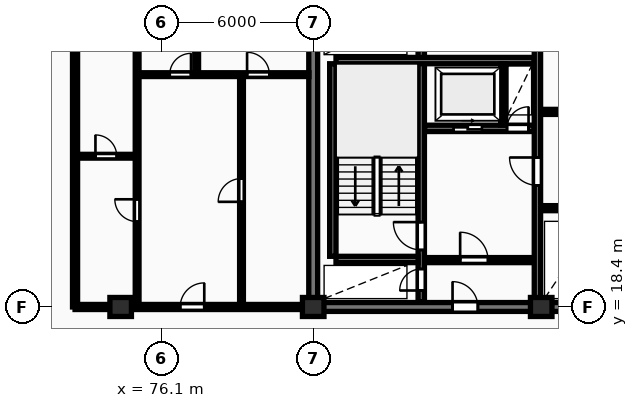
"""IFC4 building model, lengths in metres.
Left out: names, types, materials, properties, quantities, classifications, styles, units other than length and angle.
Written with IfcOpenShell. Run it as: python <this file> out.ifc"""

import sys

from ifc_helpers import new_model, si_unit, direction, frame, frame_2d, origin, origin_2d, place, context, subcontext, project, spatial, rectangle, extrude, element, fill, save


model = new_model("IFC4")
c1 = context("Model", 3, precision=1e-05, world=origin(), true_north=direction((0.0, 1.0)))
c2 = subcontext(c1, "Body", "Model", "MODEL_VIEW")
j1 = project(units=[si_unit("LENGTHUNIT", "METRE"), si_unit("PLANEANGLEUNIT", "RADIAN")], contexts=[c1])
p1 = place(None, origin())
s1 = spatial("IfcSite", under=j1, at=p1, CompositionType="ELEMENT")
p2 = place(p1, origin())
s2 = spatial("IfcBuilding", under=s1, at=p2, CompositionType="ELEMENT")
p3 = place(p2, frame((0.0, 0.0, 106.8)))
s3 = spatial("IfcBuildingStorey", under=s2, at=p3, CompositionType="ELEMENT", Elevation=106.8)
for number, where, z_axis, x_axis in (
    (1, (74.5, 18.4, 0.0), (0.0, 0.0, 1.0), (1.0, 0.0, 0.0)),
    (2, (82.1, 18.4, 0.0), (0.0, 0.0, 1.0), (1.0, 0.0, 0.0)),
    (3, (91.1, 18.4, 0.0), (0.0, 0.0, 1.0), (1.0, 0.0, 0.0)),
):
    element("IfcColumn", number, at=place(p3, frame(where, z_axis=z_axis, x_axis=x_axis)), inside=s3, PredefinedType="COLUMN", context=c2, shape_type="SweptSolid", body=[
        extrude(rectangle(XDim=0.85, YDim=0.75, at=origin_2d()), origin(), (0.0, 0.0, 1.0), 3.25),
    ])
p4 = place(p3, frame((82.1, 18.575, 0.0), z_axis=(0.0, 0.0, 1.0), x_axis=(0.0, 1.0, 0.0)))
e4 = element("IfcWall", 4, at=p4, inside=s3, PredefinedType="SHEAR", context=c2, shape_type="SweptSolid", body=[
    extrude(rectangle(XDim=11.65, YDim=0.35, at=frame_2d((5.825, 0.0))), origin(), (0.0, 0.0, 1.0), 3.25),
])
p5 = place(p3, frame((81.925, 18.4, 0.0), z_axis=(0.0, 0.0, 1.0), x_axis=(1.0, 0.0, 0.0)))
e5 = element("IfcWall", 5, at=p5, inside=s3, PredefinedType="SHEAR", context=c2, shape_type="SweptSolid", body=[
    extrude(rectangle(XDim=36.265, YDim=0.35, at=frame_2d((18.132, 0.0))), origin(), (0.0, 0.0, 1.0), 3.25),
])
p6 = place(p5, frame((5.675, 0.0, 0.0)))
e6 = element("IfcOpeningElement", 6, at=p6, cuts=e5, PredefinedType="OPENING", context=c2, shape_type="SweptSolid", body=[
    extrude(rectangle(XDim=1.0, YDim=2.15, at=frame_2d((0.5, 1.075))), frame((0.0, 0.185, 0.0), z_axis=(0.0, -1.0, 0.0), x_axis=(1.0, 0.0, 0.0)), (0.0, 0.0, 1.0), 0.37),
])
p7 = place(p5, frame((21.925, 0.0, 0.0)))
e7 = element("IfcOpeningElement", 7, at=p7, cuts=e5, PredefinedType="OPENING", context=c2, shape_type="SweptSolid", body=[
    extrude(rectangle(XDim=1.5, YDim=2.2, at=frame_2d((0.75, 1.1))), frame((0.0, 0.185, 0.0), z_axis=(0.0, -1.0, 0.0), x_axis=(1.0, 0.0, 0.0)), (0.0, 0.0, 1.0), 0.37),
])
p8 = place(p5, frame((29.875, 0.0, 0.0)))
e8 = element("IfcOpeningElement", 8, at=p8, cuts=e5, PredefinedType="OPENING", context=c2, shape_type="SweptSolid", body=[
    extrude(rectangle(XDim=1.0, YDim=2.15, at=frame_2d((0.5, 1.075))), frame((0.0, 0.185, 0.0), z_axis=(0.0, -1.0, 0.0), x_axis=(1.0, 0.0, 0.0)), (0.0, 0.0, 1.0), 0.37),
])
p9 = place(p3, frame((82.875, 20.4, 0.0), z_axis=(0.0, 0.0, 1.0), x_axis=(0.0, 1.0, 0.0)))
e9 = element("IfcWall", 9, at=p9, inside=s3, PredefinedType="SHEAR", context=c2, shape_type="SweptSolid", body=[
    extrude(rectangle(XDim=7.6, YDim=0.25, at=frame_2d((3.8, 0.0))), origin(), (0.0, 0.0, 1.0), 3.25),
])
p10 = place(p3, frame((86.365, 18.6, 0.0), z_axis=(0.0, 0.0, 1.0), x_axis=(0.0, 1.0, 0.0)))
e10 = element("IfcWall", 10, at=p10, inside=s3, PredefinedType="SHEAR", context=c2, shape_type="SweptSolid", body=[
    extrude(rectangle(XDim=11.6, YDim=0.25, at=frame_2d((5.8, 0.0))), origin(), (0.0, 0.0, 1.0), 3.25),
])
p11 = place(p10, frame((0.45, 0.0, 0.0)))
e11 = element("IfcOpeningElement", 11, at=p11, cuts=e10, PredefinedType="OPENING", context=c2, shape_type="SweptSolid", body=[
    extrude(rectangle(XDim=0.85, YDim=2.05, at=frame_2d((0.425, 1.025))), frame((0.0, 0.135, 0.0), z_axis=(0.0, -1.0, 0.0), x_axis=(1.0, 0.0, 0.0)), (0.0, 0.0, 1.0), 0.27),
])
p12 = place(p10, frame((2.05, 0.0, 0.0)))
e12 = element("IfcOpeningElement", 12, at=p12, cuts=e10, PredefinedType="OPENING", context=c2, shape_type="SweptSolid", body=[
    extrude(rectangle(XDim=1.1, YDim=2.1, at=frame_2d((0.55, 1.05))), frame((0.0, 0.135, 0.0), z_axis=(0.0, -1.0, 0.0), x_axis=(1.0, 0.0, 0.0)), (0.0, 0.0, 1.0), 0.27),
])
p13 = place(p10, frame((9.95, 0.0, 0.0)))
e13 = element("IfcOpeningElement", 13, at=p13, cuts=e10, PredefinedType="OPENING", context=c2, shape_type="SweptSolid", body=[
    extrude(rectangle(XDim=0.85, YDim=2.05, at=frame_2d((0.425, 1.025))), frame((0.0, 0.135, 0.0), z_axis=(0.0, -1.0, 0.0), x_axis=(1.0, 0.0, 0.0)), (0.0, 0.0, 1.0), 0.27),
])
p14 = place(p3, frame((83.0, 20.275, 0.0), z_axis=(0.0, 0.0, 1.0), x_axis=(1.0, 0.0, 0.0)))
e14 = element("IfcWall", 14, at=p14, inside=s3, PredefinedType="SHEAR", context=c2, shape_type="SweptSolid", body=[
    extrude(rectangle(XDim=3.24, YDim=0.25, at=frame_2d((1.62, 0.0))), origin(), (0.0, 0.0, 1.0), 3.25),
])
p15 = place(p3, frame((83.0, 28.125, 0.0), z_axis=(0.0, 0.0, 1.0), x_axis=(1.0, 0.0, 0.0)))
e15 = element("IfcWall", 15, at=p15, inside=s3, PredefinedType="SHEAR", context=c2, shape_type="SweptSolid", body=[
    extrude(rectangle(XDim=7.82, YDim=0.25, at=frame_2d((3.91, 0.0))), origin(), (0.0, 0.0, 1.0), 3.25),
])
p16 = place(p3, frame((86.5, 25.45, 0.0), z_axis=(0.0, 0.0, 1.0), x_axis=(1.0, 0.0, 0.0)))
e16 = element("IfcWall", 16, at=p16, inside=s3, PredefinedType="SHEAR", context=c2, shape_type="SweptSolid", body=[
    extrude(rectangle(XDim=4.32, YDim=0.25, at=frame_2d((2.16, 0.0))), origin(), (0.0, 0.0, 1.0), 3.25),
])
p17 = place(p16, frame((1.14, 0.0, 0.0)))
e17 = element("IfcOpeningElement", 17, at=p17, cuts=e16, PredefinedType="OPENING", context=c2, shape_type="SweptSolid", body=[
    extrude(rectangle(XDim=1.12, YDim=2.12, at=frame_2d((0.56, 1.06))), frame((0.0, 0.135, 0.0), z_axis=(0.0, -1.0, 0.0), x_axis=(1.0, 0.0, 0.0)), (0.0, 0.0, 1.0), 0.27),
])
p18 = place(p16, frame((3.25, 0.0, 0.0)))
e18 = element("IfcOpeningElement", 18, at=p18, cuts=e16, PredefinedType="OPENING", context=c2, shape_type="SweptSolid", body=[
    extrude(rectangle(XDim=0.85, YDim=2.05, at=frame_2d((0.425, 1.025))), frame((0.0, 0.135, 0.0), z_axis=(0.0, -1.0, 0.0), x_axis=(1.0, 0.0, 0.0)), (0.0, 0.0, 1.0), 0.27),
])
p19 = place(p3, frame((89.6, 25.58, 0.0), z_axis=(0.0, 0.0, 1.0), x_axis=(0.0, 1.0, 0.0)))
e19 = element("IfcWall", 19, at=p19, inside=s3, PredefinedType="PARTITIONING", context=c2, shape_type="SweptSolid", body=[
    extrude(rectangle(XDim=2.42, YDim=0.2, at=frame_2d((1.21, 0.0))), origin(), (0.0, 0.0, 1.0), 2.97),
])
p20 = place(p3, frame((86.5, 20.25, 0.0), z_axis=(0.0, 0.0, 1.0), x_axis=(1.0, 0.0, 0.0)))
e20 = element("IfcWall", 20, at=p20, inside=s3, PredefinedType="PARTITIONING", context=c2, shape_type="SweptSolid", body=[
    extrude(rectangle(XDim=4.32, YDim=0.2, at=frame_2d((2.16, 0.0))), origin(), (0.0, 0.0, 1.0), 2.97),
])
p21 = place(p20, frame((1.4, 0.0, 0.0)))
e21 = element("IfcOpeningElement", 21, at=p21, cuts=e20, PredefinedType="OPENING", context=c2, shape_type="SweptSolid", body=[
    extrude(rectangle(XDim=1.1, YDim=2.1, at=frame_2d((0.55, 1.05))), frame((0.0, 0.11, 0.0), z_axis=(0.0, -1.0, 0.0), x_axis=(1.0, 0.0, 0.0)), (0.0, 0.0, 1.0), 0.22),
])
p22 = place(p3, frame((90.95, 18.6, 0.0), z_axis=(0.0, 0.0, 1.0), x_axis=(0.0, 1.0, 0.0)))
e22 = element("IfcWall", 22, at=p22, inside=s3, PredefinedType="SHEAR", context=c2, shape_type="SweptSolid", body=[
    extrude(rectangle(XDim=11.6, YDim=0.25, at=frame_2d((5.8, 0.0))), origin(), (0.0, 0.0, 1.0), 3.25),
])
p23 = place(p22, frame((4.6, 0.0, 0.0)))
e23 = element("IfcOpeningElement", 23, at=p23, cuts=e22, PredefinedType="OPENING", context=c2, shape_type="SweptSolid", body=[
    extrude(rectangle(XDim=1.1, YDim=2.1, at=frame_2d((0.55, 1.05))), frame((0.0, 0.135, 0.0), z_axis=(0.0, -1.0, 0.0), x_axis=(1.0, 0.0, 0.0)), (0.0, 0.0, 1.0), 0.27),
])
p24 = place(p3, frame((91.08, 26.1, 0.0), z_axis=(0.0, 0.0, 1.0), x_axis=(1.0, 0.0, 0.0)))
e24 = element("IfcWall", 24, at=p24, inside=s3, PredefinedType="PARTITIONING", context=c2, shape_type="SweptSolid", body=[
    extrude(rectangle(XDim=8.34, YDim=0.2, at=frame_2d((4.17, 0.0))), origin(), (0.0, 0.0, 1.0), 2.97),
])
p25 = place(p24, frame((3.4, 0.0, 0.0)))
e25 = element("IfcOpeningElement", 25, at=p25, cuts=e24, PredefinedType="OPENING", context=c2, shape_type="SweptSolid", body=[
    extrude(rectangle(XDim=0.92, YDim=2.08, at=frame_2d((0.46, 1.04))), frame((0.0, 0.11, 0.0), z_axis=(0.0, -1.0, 0.0), x_axis=(1.0, 0.0, 0.0)), (0.0, 0.0, 1.0), 0.22),
])
p26 = place(p3, frame((91.08, 22.3, 0.0), z_axis=(0.0, 0.0, 1.0), x_axis=(1.0, 0.0, 0.0)))
e26 = element("IfcWall", 26, at=p26, inside=s3, PredefinedType="PARTITIONING", context=c2, shape_type="SweptSolid", body=[
    extrude(rectangle(XDim=19.14, YDim=0.2, at=frame_2d((9.57, 0.0))), origin(), (0.0, 0.0, 1.0), 2.97),
])
p27 = place(p26, frame((1.15, 0.0, 0.0)))
e27 = element("IfcOpeningElement", 27, at=p27, cuts=e26, PredefinedType="OPENING", context=c2, shape_type="SweptSolid", body=[
    extrude(rectangle(XDim=0.85, YDim=2.05, at=frame_2d((0.425, 1.025))), frame((0.0, 0.11, 0.0), z_axis=(0.0, -1.0, 0.0), x_axis=(1.0, 0.0, 0.0)), (0.0, 0.0, 1.0), 0.22),
])
p28 = place(p26, frame((3.2, 0.0, 0.0)))
e28 = element("IfcOpeningElement", 28, at=p28, cuts=e26, PredefinedType="OPENING", context=c2, shape_type="SweptSolid", body=[
    extrude(rectangle(XDim=0.85, YDim=2.05, at=frame_2d((0.425, 1.025))), frame((0.0, 0.11, 0.0), z_axis=(0.0, -1.0, 0.0), x_axis=(1.0, 0.0, 0.0)), (0.0, 0.0, 1.0), 0.22),
])
p29 = place(p26, frame((12.72, 0.0, 0.0)))
e29 = element("IfcOpeningElement", 29, at=p29, cuts=e26, PredefinedType="OPENING", context=c2, shape_type="SweptSolid", body=[
    extrude(rectangle(XDim=1.5, YDim=2.2, at=frame_2d((0.75, 1.1))), frame((0.0, 0.11, 0.0), z_axis=(0.0, -1.0, 0.0), x_axis=(1.0, 0.0, 0.0)), (0.0, 0.0, 1.0), 0.22),
])
p30 = place(p26, frame((5.52, 0.0, 0.0)))
e30 = element("IfcOpeningElement", 30, at=p30, cuts=e26, PredefinedType="OPENING", context=c2, shape_type="SweptSolid", body=[
    extrude(rectangle(XDim=0.88, YDim=2.06, at=frame_2d((0.44, 1.03))), frame((0.0, 0.11, 0.0), z_axis=(0.0, -1.0, 0.0), x_axis=(1.0, 0.0, 0.0)), (0.0, 0.0, 1.0), 0.22),
])
p31 = place(p26, frame((7.67, 0.0, 0.0)))
e31 = element("IfcOpeningElement", 31, at=p31, cuts=e26, PredefinedType="OPENING", context=c2, shape_type="SweptSolid", body=[
    extrude(rectangle(XDim=0.88, YDim=2.06, at=frame_2d((0.44, 1.03))), frame((0.0, 0.11, 0.0), z_axis=(0.0, -1.0, 0.0), x_axis=(1.0, 0.0, 0.0)), (0.0, 0.0, 1.0), 0.22),
])
p32 = place(p26, frame((10.27, 0.0, 0.0)))
e32 = element("IfcOpeningElement", 32, at=p32, cuts=e26, PredefinedType="OPENING", context=c2, shape_type="SweptSolid", body=[
    extrude(rectangle(XDim=0.85, YDim=2.05, at=frame_2d((0.425, 1.025))), frame((0.0, 0.11, 0.0), z_axis=(0.0, -1.0, 0.0), x_axis=(1.0, 0.0, 0.0)), (0.0, 0.0, 1.0), 0.22),
])
p33 = place(p26, frame((15.92, 0.0, 0.0)))
e33 = element("IfcOpeningElement", 33, at=p33, cuts=e26, PredefinedType="OPENING", context=c2, shape_type="SweptSolid", body=[
    extrude(rectangle(XDim=0.96, YDim=2.1, at=frame_2d((0.48, 1.05))), frame((0.0, 0.11, 0.0), z_axis=(0.0, -1.0, 0.0), x_axis=(1.0, 0.0, 0.0)), (0.0, 0.0, 1.0), 0.22),
])
p34 = place(p3, frame((72.7, 18.4, 0.0), z_axis=(0.0, 0.0, 1.0), x_axis=(0.0, 1.0, 0.0)))
e34 = element("IfcWall", 34, at=p34, inside=s3, PredefinedType="PARTITIONING", context=c2, shape_type="SweptSolid", body=[
    extrude(rectangle(XDim=14.1, YDim=0.2, at=frame_2d((7.05, 0.0))), origin(), (0.0, 0.0, 1.0), 2.97),
])
p35 = place(p3, frame((72.7, 24.35, 0.0), z_axis=(0.0, 0.0, 1.0), x_axis=(1.0, 0.0, 0.0)))
e35 = element("IfcWall", 35, at=p35, inside=s3, PredefinedType="PARTITIONING", context=c2, shape_type="SweptSolid", body=[
    extrude(rectangle(XDim=2.45, YDim=0.15, at=frame_2d((1.225, 0.0))), origin(), (0.0, 0.0, 1.0), 2.97),
])
p36 = place(p35, frame((0.805, 0.0, 0.0)))
e36 = element("IfcOpeningElement", 36, at=p36, cuts=e35, PredefinedType="OPENING", context=c2, shape_type="SweptSolid", body=[
    extrude(rectangle(XDim=0.84, YDim=2.04, at=frame_2d((0.42, 1.02))), frame((0.0, 0.085, 0.0), z_axis=(0.0, -1.0, 0.0), x_axis=(1.0, 0.0, 0.0)), (0.0, 0.0, 1.0), 0.17),
])
p37 = place(p3, frame((75.15, 18.45, 0.0), z_axis=(0.0, 0.0, 1.0), x_axis=(0.0, 1.0, 0.0)))
e37 = element("IfcWall", 37, at=p37, inside=s3, PredefinedType="PARTITIONING", context=c2, shape_type="SweptSolid", body=[
    extrude(rectangle(XDim=14.05, YDim=0.15, at=frame_2d((7.025, 0.0))), origin(), (0.0, 0.0, 1.0), 2.97),
])
p38 = place(p37, frame((3.32, 0.0, 0.0)))
e38 = element("IfcOpeningElement", 38, at=p38, cuts=e37, PredefinedType="OPENING", context=c2, shape_type="SweptSolid", body=[
    extrude(rectangle(XDim=0.88, YDim=2.06, at=frame_2d((0.44, 1.03))), frame((0.0, 0.085, 0.0), z_axis=(0.0, -1.0, 0.0), x_axis=(1.0, 0.0, 0.0)), (0.0, 0.0, 1.0), 0.17),
])
p39 = place(p3, frame((79.27, 18.45, 0.0), z_axis=(0.0, 0.0, 1.0), x_axis=(0.0, 1.0, 0.0)))
e39 = element("IfcWall", 39, at=p39, inside=s3, PredefinedType="PARTITIONING", context=c2, shape_type="SweptSolid", body=[
    extrude(rectangle(XDim=9.12, YDim=0.15, at=frame_2d((4.56, 0.0))), origin(), (0.0, 0.0, 1.0), 2.97),
])
p40 = place(p39, frame((4.1, 0.0, 0.0)))
e40 = element("IfcOpeningElement", 40, at=p40, cuts=e39, PredefinedType="OPENING", context=c2, shape_type="SweptSolid", body=[
    extrude(rectangle(XDim=0.92, YDim=2.08, at=frame_2d((0.46, 1.04))), frame((0.0, 0.085, 0.0), z_axis=(0.0, -1.0, 0.0), x_axis=(1.0, 0.0, 0.0)), (0.0, 0.0, 1.0), 0.17),
])
p41 = place(p3, frame((77.5, 27.57, 0.0), z_axis=(0.0, 0.0, 1.0), x_axis=(0.0, 1.0, 0.0)))
e41 = element("IfcWall", 41, at=p41, inside=s3, PredefinedType="PARTITIONING", context=c2, shape_type="SweptSolid", body=[
    extrude(rectangle(XDim=4.93, YDim=0.15, at=frame_2d((2.465, 0.0))), origin(), (0.0, 0.0, 1.0), 2.97),
])
p42 = place(p3, frame((75.17, 27.57, 0.0), z_axis=(0.0, 0.0, 1.0), x_axis=(1.0, 0.0, 0.0)))
e42 = element("IfcWall", 42, at=p42, inside=s3, PredefinedType="PARTITIONING", context=c2, shape_type="SweptSolid", body=[
    extrude(rectangle(XDim=6.76, YDim=0.15, at=frame_2d((3.38, 0.0))), origin(), (0.0, 0.0, 1.0), 2.97),
])
p43 = place(p42, frame((1.266, 0.0, 0.0)))
e43 = element("IfcOpeningElement", 43, at=p43, cuts=e42, PredefinedType="OPENING", context=c2, shape_type="SweptSolid", body=[
    extrude(rectangle(XDim=0.84, YDim=2.04, at=frame_2d((0.42, 1.02))), frame((0.0, 0.085, 0.0), z_axis=(0.0, -1.0, 0.0), x_axis=(1.0, 0.0, 0.0)), (0.0, 0.0, 1.0), 0.17),
])
p44 = place(p42, frame((4.32, 0.0, 0.0)))
e44 = element("IfcOpeningElement", 44, at=p44, cuts=e42, PredefinedType="OPENING", context=c2, shape_type="SweptSolid", body=[
    extrude(rectangle(XDim=0.88, YDim=2.06, at=frame_2d((0.44, 1.03))), frame((0.0, 0.085, 0.0), z_axis=(0.0, -1.0, 0.0), x_axis=(1.0, 0.0, 0.0)), (0.0, 0.0, 1.0), 0.17),
])
p45 = place(p3, frame((72.7, 18.4, 0.0), z_axis=(0.0, 0.0, 1.0), x_axis=(1.0, 0.0, 0.0)))
e45 = element("IfcWall", 45, at=p45, inside=s3, PredefinedType="PARTITIONING", context=c2, shape_type="SweptSolid", body=[
    extrude(rectangle(XDim=9.25, YDim=0.2, at=frame_2d((4.625, 0.0))), origin(), (0.0, 0.0, 1.0), 2.358),
])
p46 = place(p45, frame((4.15, 0.0, 0.0)))
e46 = element("IfcOpeningElement", 46, at=p46, cuts=e45, PredefinedType="OPENING", context=c2, shape_type="SweptSolid", body=[
    extrude(rectangle(XDim=0.95, YDim=2.15, at=frame_2d((0.475, 1.075))), frame((0.0, 0.11, 0.0), z_axis=(0.0, -1.0, 0.0), x_axis=(1.0, 0.0, 0.0)), (0.0, 0.0, 1.0), 0.22),
])
p47 = place(p6, origin())
e47 = element("IfcDoor", 47, at=p47, inside=s3, OperationType="SINGLE_SWING_LEFT", PredefinedType="DOOR", context=c2, shape_type="SweptSolid", body=[
    extrude(rectangle(XDim=1.0, YDim=2.15, at=frame_2d((0.5, 1.075))), frame((0.0, 0.025, 0.0), z_axis=(0.0, -1.0, 0.0), x_axis=(1.0, 0.0, 0.0)), (0.0, 0.0, 1.0), 0.05),
])
fill(e6, e47)
p48 = place(p11, origin())
e48 = element("IfcDoor", 48, at=p48, inside=s3, OperationType="SINGLE_SWING_LEFT", PredefinedType="DOOR", context=c2, shape_type="SweptSolid", body=[
    extrude(rectangle(XDim=0.85, YDim=2.05, at=frame_2d((0.425, 1.025))), frame((0.0, 0.025, 0.0), z_axis=(0.0, -1.0, 0.0), x_axis=(1.0, 0.0, 0.0)), (0.0, 0.0, 1.0), 0.05),
])
fill(e11, e48)
p49 = place(p12, origin())
e49 = element("IfcDoor", 49, at=p49, inside=s3, OperationType="SINGLE_SWING_RIGHT", PredefinedType="DOOR", context=c2, shape_type="SweptSolid", body=[
    extrude(rectangle(XDim=1.1, YDim=2.1, at=frame_2d((0.55, 1.05))), frame((0.0, 0.025, 0.0), z_axis=(0.0, -1.0, 0.0), x_axis=(1.0, 0.0, 0.0)), (0.0, 0.0, 1.0), 0.05),
])
fill(e12, e49)
p50 = place(p17, origin())
e50 = element("IfcDoor", 50, at=p50, inside=s3, OperationType="SLIDING_TO_RIGHT", PredefinedType="DOOR", context=c2, shape_type="SweptSolid", body=[
    extrude(rectangle(XDim=1.12, YDim=2.12, at=frame_2d((0.56, 1.06))), frame((0.0, 0.025, 0.0), z_axis=(0.0, -1.0, 0.0), x_axis=(1.0, 0.0, 0.0)), (0.0, 0.0, 1.0), 0.05),
])
fill(e17, e50)
p51 = place(p18, origin())
e51 = element("IfcDoor", 51, at=p51, inside=s3, OperationType="SINGLE_SWING_RIGHT", PredefinedType="DOOR", context=c2, shape_type="SweptSolid", body=[
    extrude(rectangle(XDim=0.85, YDim=2.05, at=frame_2d((0.425, 1.025))), frame((0.0, 0.025, 0.0), z_axis=(0.0, -1.0, 0.0), x_axis=(1.0, 0.0, 0.0)), (0.0, 0.0, 1.0), 0.05),
])
fill(e18, e51)
p52 = place(p21, origin())
e52 = element("IfcDoor", 52, at=p52, inside=s3, OperationType="SINGLE_SWING_LEFT", PredefinedType="DOOR", context=c2, shape_type="SweptSolid", body=[
    extrude(rectangle(XDim=1.1, YDim=2.1, at=frame_2d((0.55, 1.05))), frame((0.0, 0.025, 0.0), z_axis=(0.0, -1.0, 0.0), x_axis=(1.0, 0.0, 0.0)), (0.0, 0.0, 1.0), 0.05),
])
fill(e21, e52)
p53 = place(p23, origin())
e53 = element("IfcDoor", 53, at=p53, inside=s3, OperationType="SINGLE_SWING_RIGHT", PredefinedType="DOOR", context=c2, shape_type="SweptSolid", body=[
    extrude(rectangle(XDim=1.1, YDim=2.1, at=frame_2d((0.55, 1.05))), frame((0.0, 0.025, 0.0), z_axis=(0.0, -1.0, 0.0), x_axis=(1.0, 0.0, 0.0)), (0.0, 0.0, 1.0), 0.05),
])
fill(e23, e53)
p54 = place(p36, origin())
e54 = element("IfcDoor", 54, at=p54, inside=s3, OperationType="SINGLE_SWING_LEFT", PredefinedType="DOOR", context=c2, shape_type="SweptSolid", body=[
    extrude(rectangle(XDim=0.84, YDim=2.04, at=frame_2d((0.42, 1.02))), frame((0.0, 0.025, 0.0), z_axis=(0.0, -1.0, 0.0), x_axis=(1.0, 0.0, 0.0)), (0.0, 0.0, 1.0), 0.05),
])
fill(e36, e54)
p55 = place(p38, origin())
e55 = element("IfcDoor", 55, at=p55, inside=s3, OperationType="SINGLE_SWING_RIGHT", PredefinedType="DOOR", context=c2, shape_type="SweptSolid", body=[
    extrude(rectangle(XDim=0.88, YDim=2.06, at=frame_2d((0.44, 1.03))), frame((0.0, 0.025, 0.0), z_axis=(0.0, -1.0, 0.0), x_axis=(1.0, 0.0, 0.0)), (0.0, 0.0, 1.0), 0.05),
])
fill(e38, e55)
p56 = place(p40, origin())
e56 = element("IfcDoor", 56, at=p56, inside=s3, OperationType="SINGLE_SWING_LEFT", PredefinedType="DOOR", context=c2, shape_type="SweptSolid", body=[
    extrude(rectangle(XDim=0.92, YDim=2.08, at=frame_2d((0.46, 1.04))), frame((0.0, 0.025, 0.0), z_axis=(0.0, -1.0, 0.0), x_axis=(1.0, 0.0, 0.0)), (0.0, 0.0, 1.0), 0.05),
])
fill(e40, e56)
p57 = place(p43, origin())
e57 = element("IfcDoor", 57, at=p57, inside=s3, OperationType="SINGLE_SWING_RIGHT", PredefinedType="DOOR", context=c2, shape_type="SweptSolid", body=[
    extrude(rectangle(XDim=0.84, YDim=2.04, at=frame_2d((0.42, 1.02))), frame((0.0, 0.025, 0.0), z_axis=(0.0, -1.0, 0.0), x_axis=(1.0, 0.0, 0.0)), (0.0, 0.0, 1.0), 0.05),
])
fill(e43, e57)
p58 = place(p44, origin())
e58 = element("IfcDoor", 58, at=p58, inside=s3, OperationType="SINGLE_SWING_LEFT", PredefinedType="DOOR", context=c2, shape_type="SweptSolid", body=[
    extrude(rectangle(XDim=0.88, YDim=2.06, at=frame_2d((0.44, 1.03))), frame((0.0, 0.025, 0.0), z_axis=(0.0, -1.0, 0.0), x_axis=(1.0, 0.0, 0.0)), (0.0, 0.0, 1.0), 0.05),
])
fill(e44, e58)
p59 = place(p46, origin())
e59 = element("IfcDoor", 59, at=p59, inside=s3, OperationType="SINGLE_SWING_RIGHT", PredefinedType="DOOR", context=c2, shape_type="SweptSolid", body=[
    extrude(rectangle(XDim=0.95, YDim=2.15, at=frame_2d((0.475, 1.075))), frame((0.0, 0.025, 0.0), z_axis=(0.0, -1.0, 0.0), x_axis=(1.0, 0.0, 0.0)), (0.0, 0.0, 1.0), 0.05),
])
fill(e46, e59)
save(model, sys.argv[1])
